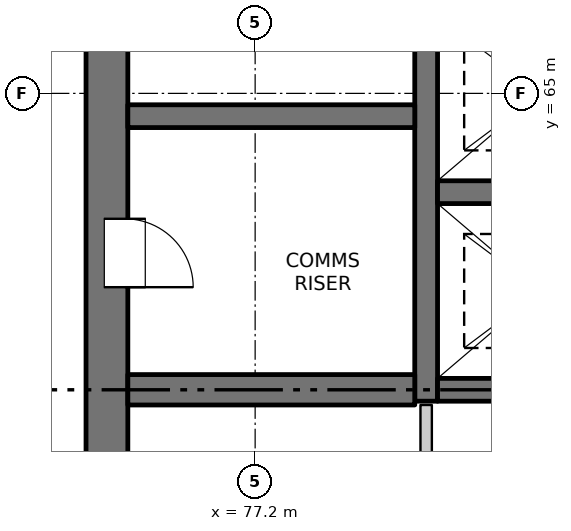
"""IFC4 building model, lengths in metres.
Left out: names, types, materials, properties, quantities, classifications, styles, units other than length and angle.
Written with IfcOpenShell. Run it as: python <this file> out.ifc"""

import sys

from ifc_helpers import new_model, si_unit, direction, frame, frame_2d, origin, place, context, subcontext, project, spatial, rectangle, extrude, element, fill, save


model = new_model("IFC4")
c1 = context("Model", 3, precision=1e-05, world=origin(), true_north=direction((0.0, 1.0)))
c2 = subcontext(c1, "Body", "Model", "MODEL_VIEW")
j1 = project(units=[si_unit("LENGTHUNIT", "METRE"), si_unit("PLANEANGLEUNIT", "RADIAN")], contexts=[c1])
p1 = place(None, origin())
s1 = spatial("IfcSite", under=j1, at=p1, CompositionType="ELEMENT")
p2 = place(p1, origin())
s2 = spatial("IfcBuilding", under=s1, at=p2, CompositionType="ELEMENT")
p3 = place(p2, frame((0.0, 0.0, 110.1)))
s3 = spatial("IfcBuildingStorey", under=s2, at=p3, CompositionType="ELEMENT", Elevation=110.1)
p4 = place(p3, frame((75.25, 54.975, -0.25), z_axis=(0.0, 0.0, 1.0), x_axis=(0.0, 1.0, 0.0)))
e1 = element("IfcWall", 1, at=p4, inside=s3, PredefinedType="SOLIDWALL", context=c2, shape_type="SweptSolid", body=[
    extrude(rectangle(XDim=22.325, YDim=0.55, at=frame_2d((11.163, 0.0))), origin(), (0.0, 0.0, 1.0), 3.4),
])
p5 = place(p4, frame((7.475, 0.0, 0.25)))
e2 = element("IfcOpeningElement", 2, at=p5, cuts=e1, PredefinedType="OPENING", context=c2, shape_type="SweptSolid", body=[
    extrude(rectangle(XDim=0.9, YDim=2.1, at=frame_2d((0.45, 1.05))), frame((0.0, 0.285, 0.0), z_axis=(0.0, -1.0, 0.0), x_axis=(1.0, 0.0, 0.0)), (0.0, 0.0, 1.0), 0.57),
])
p6 = place(p4, frame((10.775, 0.0, 0.25)))
e3 = element("IfcOpeningElement", 3, at=p6, cuts=e1, PredefinedType="OPENING", context=c2, shape_type="SweptSolid", body=[
    extrude(rectangle(XDim=0.9, YDim=2.1, at=frame_2d((0.45, 1.05))), frame((0.0, 0.285, 0.0), z_axis=(0.0, -1.0, 0.0), x_axis=(1.0, 0.0, 0.0)), (0.0, 0.0, 1.0), 0.57),
])
p7 = place(p4, frame((15.275, 0.0, 0.25)))
e4 = element("IfcOpeningElement", 4, at=p7, cuts=e1, PredefinedType="OPENING", context=c2, shape_type="SweptSolid", body=[
    extrude(rectangle(XDim=0.9, YDim=2.1, at=frame_2d((0.45, 1.05))), frame((0.0, 0.285, 0.0), z_axis=(0.0, -1.0, 0.0), x_axis=(1.0, 0.0, 0.0)), (0.0, 0.0, 1.0), 0.57),
])
p8 = place(p4, frame((20.075, 0.0, 0.25)))
e5 = element("IfcOpeningElement", 5, at=p8, cuts=e1, PredefinedType="OPENING", context=c2, shape_type="SweptSolid", body=[
    extrude(rectangle(XDim=0.9, YDim=2.1, at=frame_2d((0.45, 1.05))), frame((0.0, 0.285, 0.0), z_axis=(0.0, -1.0, 0.0), x_axis=(1.0, 0.0, 0.0)), (0.0, 0.0, 1.0), 0.57),
])
p9 = place(p3, frame((79.45, 60.95, -0.25), z_axis=(0.0, 0.0, 1.0), x_axis=(0.0, 1.0, 0.0)))
e6 = element("IfcWall", 6, at=p9, inside=s3, PredefinedType="SOLIDWALL", context=c2, shape_type="SweptSolid", body=[
    extrude(rectangle(XDim=16.35, YDim=0.3, at=frame_2d((8.175, 0.0))), origin(), (0.0, 0.0, 1.0), 3.4),
])
for number, where, z_axis, x_axis in (
    (7, (79.6, 61.1, -0.25), (0.0, 0.0, 1.0), (1.0, 0.0, 0.0)),
    (8, (79.6, 63.7, -0.25), (0.0, 0.0, 1.0), (1.0, 0.0, 0.0)),
):
    element("IfcWall", number, at=place(p3, frame(where, z_axis=z_axis, x_axis=x_axis)), inside=s3, PredefinedType="SOLIDWALL", context=c2, shape_type="SweptSolid", body=[
        extrude(rectangle(XDim=3.0, YDim=0.3, at=frame_2d((1.5, 0.0))), origin(), (0.0, 0.0, 1.0), 3.4),
    ])
p10 = place(p3, frame((75.525, 61.1, -0.25), z_axis=(0.0, 0.0, 1.0), x_axis=(1.0, 0.0, 0.0)))
e9 = element("IfcWall", 9, at=p10, inside=s3, PredefinedType="SOLIDWALL", context=c2, shape_type="SweptSolid", body=[
    extrude(rectangle(XDim=3.775, YDim=0.4, at=frame_2d((1.888, 0.0))), origin(), (0.0, 0.0, 1.0), 3.4),
])
p11 = place(p3, frame((75.525, 64.7, -0.25), z_axis=(0.0, 0.0, 1.0), x_axis=(1.0, 0.0, 0.0)))
e10 = element("IfcWall", 10, at=p11, inside=s3, PredefinedType="SOLIDWALL", context=c2, shape_type="SweptSolid", body=[
    extrude(rectangle(XDim=3.775, YDim=0.3, at=frame_2d((1.888, 0.0))), origin(), (0.0, 0.0, 1.0), 3.4),
])
p12 = place(p3, frame((79.45, 55.525, 0.0), z_axis=(0.0, 0.0, 1.0), x_axis=(0.0, 1.0, 0.0)))
e11 = element("IfcWall", 11, at=p12, inside=s3, PredefinedType="PARTITIONING", context=c2, shape_type="SweptSolid", body=[
    extrude(rectangle(XDim=5.375, YDim=0.15, at=frame_2d((2.688, 0.0))), origin(), (0.0, 0.0, 1.0), 3.15),
])
p13 = place(p12, frame((2.175, 0.0, 0.0)))
e12 = element("IfcOpeningElement", 12, at=p13, cuts=e11, PredefinedType="OPENING", context=c2, shape_type="SweptSolid", body=[
    extrude(rectangle(XDim=0.9, YDim=2.1, at=frame_2d((0.45, 1.05))), frame((0.0, 0.085, 0.0), z_axis=(0.0, -1.0, 0.0), x_axis=(1.0, 0.0, 0.0)), (0.0, 0.0, 1.0), 0.17),
])
p14 = place(p5, origin())
e13 = element("IfcDoor", 13, at=p14, inside=s3, OperationType="SINGLE_SWING_RIGHT", PredefinedType="DOOR", context=c2, shape_type="SweptSolid", body=[
    extrude(rectangle(XDim=0.9, YDim=2.1, at=frame_2d((0.45, 1.05))), frame((0.0, -0.21, 0.0), z_axis=(0.0, -1.0, 0.0), x_axis=(1.0, 0.0, 0.0)), (0.0, 0.0, 1.0), 0.05),
])
fill(e2, e13)
save(model, sys.argv[1])
